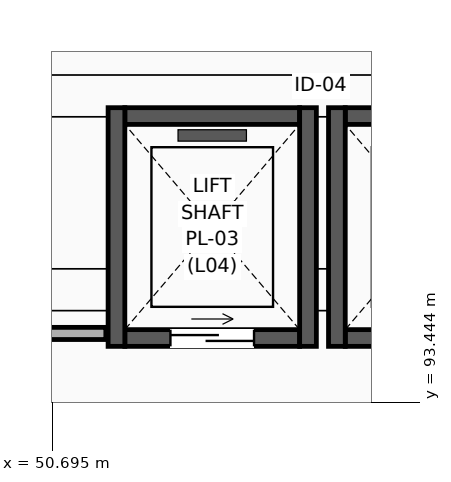
"""IFC4 building model, lengths in metres.
Left out: names, types, materials, properties, quantities, classifications, styles, units other than length and angle.
Written with IfcOpenShell. Run it as: python <this file> out.ifc"""

import sys

from ifc_helpers import new_model, si_unit, direction, frame, frame_2d, origin, place, context, subcontext, project, spatial, rectangle, extrude, element, fill, save


model = new_model("IFC4")
c1 = context("Model", 3, precision=1e-05, world=origin(), true_north=direction((0.0, 1.0)))
c2 = subcontext(c1, "Body", "Model", "MODEL_VIEW")
j1 = project(units=[si_unit("LENGTHUNIT", "METRE"), si_unit("PLANEANGLEUNIT", "RADIAN")], contexts=[c1])
p1 = place(None, origin())
s1 = spatial("IfcSite", under=j1, at=p1, CompositionType="ELEMENT")
p2 = place(p1, origin())
s2 = spatial("IfcBuilding", under=s1, at=p2, CompositionType="ELEMENT")
p3 = place(p2, frame((0.0, 0.0, 19.2)))
s3 = spatial("IfcBuildingStorey", under=s2, at=p3, CompositionType="ELEMENT", Elevation=19.2)
p4 = place(p3, frame((51.65, 94.29, 0.0), z_axis=(0.0, 0.0, 1.0), x_axis=(1.0, 0.0, 0.0)))
e1 = element("IfcWall", 1, at=p4, inside=s3, PredefinedType="SOLIDWALL", context=c2, shape_type="SweptSolid", body=[
    extrude(rectangle(XDim=2.3, YDim=0.22, at=frame_2d((1.15, 0.0))), origin(), (0.0, 0.0, 1.0), 3.965),
])
p5 = place(p4, frame((0.6, 0.0, 0.0)))
e2 = element("IfcOpeningElement", 2, at=p5, cuts=e1, PredefinedType="OPENING", context=c2, shape_type="SweptSolid", body=[
    extrude(rectangle(XDim=1.1, YDim=2.2, at=frame_2d((0.55, 1.1))), frame((0.0, 0.12, 0.0), z_axis=(0.0, -1.0, 0.0), x_axis=(1.0, 0.0, 0.0)), (0.0, 0.0, 1.0), 0.24),
])
p6 = place(p3, frame((51.65, 97.21, 0.0), z_axis=(0.0, 0.0, 1.0), x_axis=(1.0, 0.0, 0.0)))
e3 = element("IfcWall", 3, at=p6, inside=s3, PredefinedType="SOLIDWALL", context=c2, shape_type="SweptSolid", body=[
    extrude(rectangle(XDim=2.3, YDim=0.22, at=frame_2d((1.15, 0.0))), origin(), (0.0, 0.0, 1.0), 3.965),
])
for number, where, z_axis, x_axis in (
    (4, (51.54, 94.18, 0.0), (0.0, 0.0, 1.0), (0.0, 1.0, 0.0)),
    (5, (54.06, 94.18, 0.0), (0.0, 0.0, 1.0), (0.0, 1.0, 0.0)),
):
    element("IfcWall", number, at=place(p3, frame(where, z_axis=z_axis, x_axis=x_axis)), inside=s3, PredefinedType="SOLIDWALL", context=c2, shape_type="SweptSolid", body=[
        extrude(rectangle(XDim=3.14, YDim=0.22, at=frame_2d((1.57, 0.0))), origin(), (0.0, 0.0, 1.0), 3.965),
    ])
p7 = place(p3, frame((54.55, 94.29, 0.0), z_axis=(0.0, 0.0, 1.0), x_axis=(1.0, 0.0, 0.0)))
e6 = element("IfcWall", 6, at=p7, inside=s3, PredefinedType="SOLIDWALL", context=c2, shape_type="SweptSolid", body=[
    extrude(rectangle(XDim=2.3, YDim=0.22, at=frame_2d((1.15, 0.0))), origin(), (0.0, 0.0, 1.0), 3.965),
])
p8 = place(p7, frame((0.6, 0.0, 0.0)))
e7 = element("IfcOpeningElement", 7, at=p8, cuts=e6, PredefinedType="OPENING", context=c2, shape_type="SweptSolid", body=[
    extrude(rectangle(XDim=1.1, YDim=2.2, at=frame_2d((0.55, 1.1))), frame((0.0, 0.12, 0.0), z_axis=(0.0, -1.0, 0.0), x_axis=(1.0, 0.0, 0.0)), (0.0, 0.0, 1.0), 0.24),
])
p9 = place(p3, frame((54.55, 97.21, 0.0), z_axis=(0.0, 0.0, 1.0), x_axis=(1.0, 0.0, 0.0)))
e8 = element("IfcWall", 8, at=p9, inside=s3, PredefinedType="SOLIDWALL", context=c2, shape_type="SweptSolid", body=[
    extrude(rectangle(XDim=2.3, YDim=0.22, at=frame_2d((1.15, 0.0))), origin(), (0.0, 0.0, 1.0), 3.965),
])
p10 = place(p3, frame((54.44, 94.18, 0.0), z_axis=(0.0, 0.0, 1.0), x_axis=(0.0, 1.0, 0.0)))
e9 = element("IfcWall", 9, at=p10, inside=s3, PredefinedType="SOLIDWALL", context=c2, shape_type="SweptSolid", body=[
    extrude(rectangle(XDim=3.14, YDim=0.22, at=frame_2d((1.57, 0.0))), origin(), (0.0, 0.0, 1.0), 3.965),
])
p11 = place(p3, frame((46.45, 94.35, 0.0), z_axis=(0.0, 0.0, 1.0), x_axis=(1.0, 0.0, 0.0)))
e10 = element("IfcWall", 10, at=p11, inside=s3, PredefinedType="PARTITIONING", context=c2, shape_type="SweptSolid", body=[
    extrude(rectangle(XDim=4.95, YDim=0.16, at=frame_2d((2.475, 0.0))), origin(), (0.0, 0.0, 1.0), 3.297),
])
p12 = place(p5, origin())
e11 = element("IfcDoor", 11, at=p12, inside=s3, OperationType="SLIDING_TO_LEFT", PredefinedType="DOOR", context=c2, shape_type="SweptSolid", body=[
    extrude(rectangle(XDim=1.1, YDim=2.2, at=frame_2d((0.55, 1.1))), frame((0.0, 0.025, 0.0), z_axis=(0.0, -1.0, 0.0), x_axis=(1.0, 0.0, 0.0)), (0.0, 0.0, 1.0), 0.05),
])
fill(e2, e11)
save(model, sys.argv[1])
